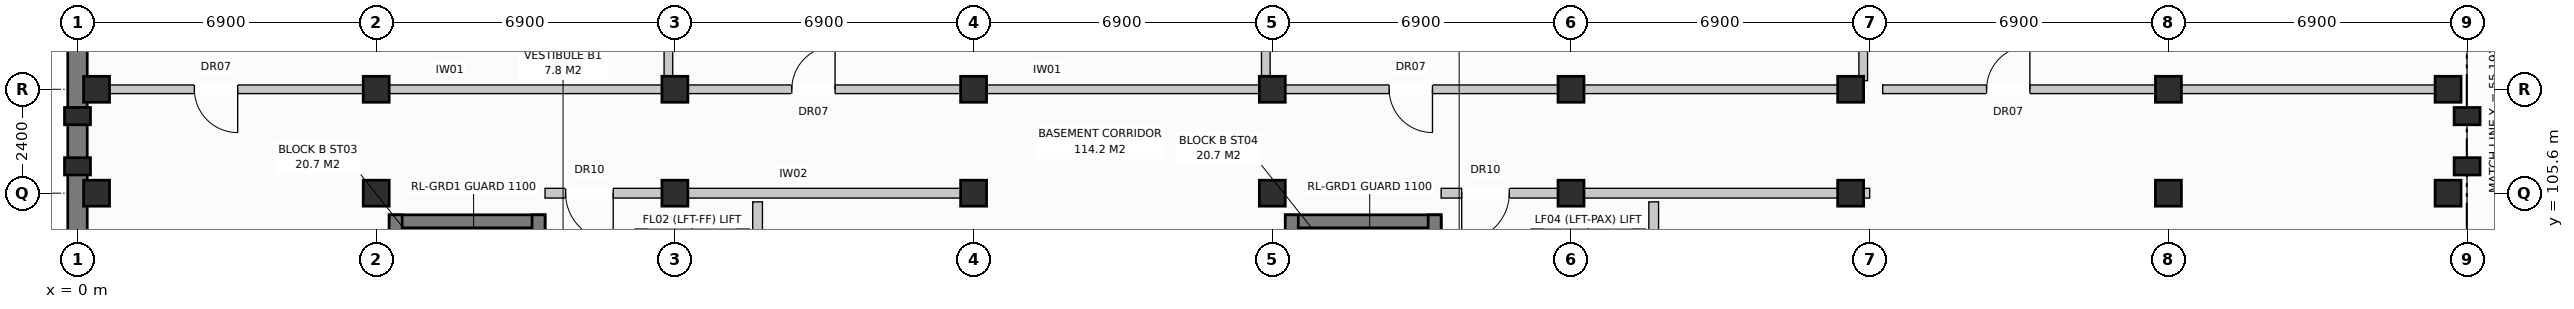
"""IFC4 building model, lengths in metres.
Left out: names, types, materials, properties, quantities, classifications, styles, units other than length and angle.
Written with IfcOpenShell. Run it as: python <this file> out.ifc"""

import sys

from ifc_helpers import new_model, si_unit, direction, frame, frame_2d, origin, origin_with_axes, origin_2d, place, context, subcontext, project, spatial, rectangle, extrude, element, fill, save


model = new_model("IFC4")
c1 = context("Model", 3, precision=1e-05, world=origin(), true_north=direction((0.0, 1.0)))
c2 = subcontext(c1, "Body", "Model", "MODEL_VIEW")
j1 = project(units=[si_unit("LENGTHUNIT", "METRE"), si_unit("PLANEANGLEUNIT", "RADIAN")], contexts=[c1])
p1 = place(None, origin())
s1 = spatial("IfcSite", under=j1, at=p1, CompositionType="ELEMENT")
p2 = place(p1, origin())
s2 = spatial("IfcBuilding", under=s1, at=p2, CompositionType="ELEMENT")
p3 = place(p2, frame((0.0, 0.0, -3.8)))
s3 = spatial("IfcBuildingStorey", under=s2, at=p3, CompositionType="ELEMENT", Elevation=-3.8)
for number, where, z_axis, x_axis in (
    (1, (0.44, 105.6, 0.0), (0.0, 0.0, 1.0), (1.0, 0.0, 0.0)),
    (2, (0.44, 108.0, 0.0), (0.0, 0.0, 1.0), (1.0, 0.0, 0.0)),
    (3, (6.9, 105.6, 0.0), (0.0, 0.0, 1.0), (1.0, 0.0, 0.0)),
    (4, (6.9, 108.0, 0.0), (0.0, 0.0, 1.0), (1.0, 0.0, 0.0)),
    (5, (13.8, 105.6, 0.0), (0.0, 0.0, 1.0), (1.0, 0.0, 0.0)),
    (6, (13.8, 108.0, 0.0), (0.0, 0.0, 1.0), (1.0, 0.0, 0.0)),
    (7, (20.7, 105.6, 0.0), (0.0, 0.0, 1.0), (1.0, 0.0, 0.0)),
    (8, (20.7, 108.0, 0.0), (0.0, 0.0, 1.0), (1.0, 0.0, 0.0)),
    (9, (27.6, 105.6, 0.0), (0.0, 0.0, 1.0), (1.0, 0.0, 0.0)),
    (10, (27.6, 108.0, 0.0), (0.0, 0.0, 1.0), (1.0, 0.0, 0.0)),
    (11, (34.5, 105.6, 0.0), (0.0, 0.0, 1.0), (1.0, 0.0, 0.0)),
    (12, (34.5, 108.0, 0.0), (0.0, 0.0, 1.0), (1.0, 0.0, 0.0)),
    (13, (40.96, 105.6, 0.0), (0.0, 0.0, 1.0), (1.0, 0.0, 0.0)),
    (14, (40.96, 108.0, 0.0), (0.0, 0.0, 1.0), (1.0, 0.0, 0.0)),
    (15, (48.3, 105.6, 0.0), (0.0, 0.0, 1.0), (1.0, 0.0, 0.0)),
    (16, (48.3, 108.0, 0.0), (0.0, 0.0, 1.0), (1.0, 0.0, 0.0)),
    (17, (54.76, 105.6, 0.0), (0.0, 0.0, 1.0), (1.0, 0.0, 0.0)),
    (18, (54.76, 108.0, 0.0), (0.0, 0.0, 1.0), (1.0, 0.0, 0.0)),
):
    element("IfcColumn", number, at=place(p3, frame(where, z_axis=z_axis, x_axis=x_axis)), inside=s3, PredefinedType="COLUMN", context=c2, shape_type="SweptSolid", body=[
        extrude(rectangle(XDim=0.6, YDim=0.6, at=origin_2d()), origin(), (0.0, 0.0, 1.0), 3.8),
    ])
for number, where, z_axis, x_axis in (
    (19, (0.0, 106.22, 0.0), (0.0, 0.0, 1.0), (0.0, 1.0, 0.0)),
    (20, (0.0, 107.38, 0.0), (0.0, 0.0, 1.0), (0.0, 1.0, 0.0)),
    (21, (55.2, 106.22, 0.0), (0.0, 0.0, 1.0), (0.0, 1.0, 0.0)),
    (22, (55.2, 107.38, 0.0), (0.0, 0.0, 1.0), (0.0, 1.0, 0.0)),
):
    element("IfcColumn", number, at=place(p3, frame(where, z_axis=z_axis, x_axis=x_axis)), inside=s3, PredefinedType="PILASTER", context=c2, shape_type="SweptSolid", body=[
        extrude(rectangle(XDim=0.4, YDim=0.6, at=origin_2d()), origin(), (0.0, 0.0, 1.0), 3.8),
    ])
p4 = place(p3, frame((0.0, 116.0, 0.0), z_axis=(0.0, 0.0, 1.0), x_axis=(0.0, -1.0, 0.0)))
e23 = element("IfcWall", 23, at=p4, inside=s3, PredefinedType="STANDARD", context=c2, shape_type="SweptSolid", body=[
    extrude(rectangle(XDim=116.0, YDim=0.45, at=frame_2d((58.0, 0.0))), origin(), (0.0, 0.0, 1.0), 3.48),
])
p5 = place(p3, frame((7.2, 104.95, 0.0), z_axis=(0.0, 0.0, 1.0), x_axis=(1.0, 0.0, 0.0)))
e24 = element("IfcWall", 24, at=p5, inside=s3, PredefinedType="SHEAR", context=c2, shape_type="SweptSolid", body=[
    extrude(rectangle(XDim=3.6, YDim=0.3, at=frame_2d((1.8, 0.0))), origin(), (0.0, 0.0, 1.0), 3.48),
])
p6 = place(p3, frame((7.35, 97.6, 0.0), z_axis=(0.0, 0.0, 1.0), x_axis=(0.0, 1.0, 0.0)))
e25 = element("IfcWall", 25, at=p6, inside=s3, PredefinedType="SHEAR", context=c2, shape_type="SweptSolid", body=[
    extrude(rectangle(XDim=7.5, YDim=0.3, at=frame_2d((3.75, 0.0))), origin(), (0.0, 0.0, 1.0), 3.48),
])
p7 = place(p3, frame((10.65, 97.6, 0.0), z_axis=(0.0, 0.0, 1.0), x_axis=(0.0, 1.0, 0.0)))
e26 = element("IfcWall", 26, at=p7, inside=s3, PredefinedType="SHEAR", context=c2, shape_type="SweptSolid", body=[
    extrude(rectangle(XDim=7.5, YDim=0.3, at=frame_2d((3.75, 0.0))), origin(), (0.0, 0.0, 1.0), 3.48),
])
p8 = place(p7, frame((0.65, 0.0, 0.0)))
e27 = element("IfcOpeningElement", 27, at=p8, cuts=e26, PredefinedType="OPENING", context=c2, shape_type="SweptSolid", body=[
    extrude(rectangle(XDim=1.15, YDim=2.15, at=frame_2d((0.575, 1.075))), frame((0.0, 0.162, 0.0), z_axis=(0.0, -1.0, 0.0), x_axis=(1.0, 0.0, 0.0)), (0.0, 0.0, 1.0), 0.324),
])
p9 = place(p3, frame((15.71, 97.8, 0.0), z_axis=(0.0, 0.0, 1.0), x_axis=(0.0, 1.0, 0.0)))
e28 = element("IfcWall", 28, at=p9, inside=s3, PredefinedType="PARTITIONING", context=c2, shape_type="SweptSolid", body=[
    extrude(rectangle(XDim=7.6, YDim=0.225, at=frame_2d((3.8, 0.0))), origin(), (0.0, 0.0, 1.0), 3.19),
])
p10 = place(p3, frame((6.9, 105.6, 0.0), z_axis=(0.0, 0.0, 1.0), x_axis=(1.0, 0.0, 0.0)))
e29 = element("IfcWall", 29, at=p10, inside=s3, PredefinedType="PARTITIONING", context=c2, shape_type="SweptSolid", body=[
    extrude(rectangle(XDim=0.3, YDim=0.225, at=frame_2d((0.15, 0.0))), origin(), (0.0, 0.0, 1.0), 3.48),
])
p11 = place(p3, frame((10.8, 105.6, 0.0), z_axis=(0.0, 0.0, 1.0), x_axis=(1.0, 0.0, 0.0)))
e30 = element("IfcWall", 30, at=p11, inside=s3, PredefinedType="PARTITIONING", context=c2, shape_type="SweptSolid", body=[
    extrude(rectangle(XDim=9.9, YDim=0.225, at=frame_2d((4.95, 0.0))), origin(), (0.0, 0.0, 1.0), 2.92),
])
p12 = place(p11, frame((0.475, 0.0, 0.0)))
e31 = element("IfcOpeningElement", 31, at=p12, cuts=e30, PredefinedType="OPENING", context=c2, shape_type="SweptSolid", body=[
    extrude(rectangle(XDim=1.1, YDim=2.15, at=frame_2d((0.55, 1.075))), frame((0.0, 0.125, 0.0), z_axis=(0.0, -1.0, 0.0), x_axis=(1.0, 0.0, 0.0)), (0.0, 0.0, 1.0), 0.249),
])
p13 = place(p3, frame((27.9, 104.95, 0.0), z_axis=(0.0, 0.0, 1.0), x_axis=(1.0, 0.0, 0.0)))
e32 = element("IfcWall", 32, at=p13, inside=s3, PredefinedType="SHEAR", context=c2, shape_type="SweptSolid", body=[
    extrude(rectangle(XDim=3.6, YDim=0.3, at=frame_2d((1.8, 0.0))), origin(), (0.0, 0.0, 1.0), 3.48),
])
p14 = place(p3, frame((28.05, 97.6, 0.0), z_axis=(0.0, 0.0, 1.0), x_axis=(0.0, 1.0, 0.0)))
e33 = element("IfcWall", 33, at=p14, inside=s3, PredefinedType="SHEAR", context=c2, shape_type="SweptSolid", body=[
    extrude(rectangle(XDim=7.5, YDim=0.3, at=frame_2d((3.75, 0.0))), origin(), (0.0, 0.0, 1.0), 3.48),
])
p15 = place(p3, frame((31.35, 97.6, 0.0), z_axis=(0.0, 0.0, 1.0), x_axis=(0.0, 1.0, 0.0)))
e34 = element("IfcWall", 34, at=p15, inside=s3, PredefinedType="SHEAR", context=c2, shape_type="SweptSolid", body=[
    extrude(rectangle(XDim=7.5, YDim=0.3, at=frame_2d((3.75, 0.0))), origin(), (0.0, 0.0, 1.0), 3.48),
])
p16 = place(p15, frame((0.65, 0.0, 0.0)))
e35 = element("IfcOpeningElement", 35, at=p16, cuts=e34, PredefinedType="OPENING", context=c2, shape_type="SweptSolid", body=[
    extrude(rectangle(XDim=1.15, YDim=2.15, at=frame_2d((0.575, 1.075))), frame((0.0, 0.162, 0.0), z_axis=(0.0, -1.0, 0.0), x_axis=(1.0, 0.0, 0.0)), (0.0, 0.0, 1.0), 0.324),
])
p17 = place(p3, frame((36.41, 97.8, 0.0), z_axis=(0.0, 0.0, 1.0), x_axis=(0.0, 1.0, 0.0)))
e36 = element("IfcWall", 36, at=p17, inside=s3, PredefinedType="PARTITIONING", context=c2, shape_type="SweptSolid", body=[
    extrude(rectangle(XDim=7.6, YDim=0.225, at=frame_2d((3.8, 0.0))), origin(), (0.0, 0.0, 1.0), 3.19),
])
p18 = place(p3, frame((27.6, 105.6, 0.0), z_axis=(0.0, 0.0, 1.0), x_axis=(1.0, 0.0, 0.0)))
e37 = element("IfcWall", 37, at=p18, inside=s3, PredefinedType="PARTITIONING", context=c2, shape_type="SweptSolid", body=[
    extrude(rectangle(XDim=0.3, YDim=0.225, at=frame_2d((0.15, 0.0))), origin(), (0.0, 0.0, 1.0), 3.48),
])
p19 = place(p3, frame((31.5, 105.6, 0.0), z_axis=(0.0, 0.0, 1.0), x_axis=(1.0, 0.0, 0.0)))
e38 = element("IfcWall", 38, at=p19, inside=s3, PredefinedType="PARTITIONING", context=c2, shape_type="SweptSolid", body=[
    extrude(rectangle(XDim=9.9, YDim=0.225, at=frame_2d((4.95, 0.0))), origin(), (0.0, 0.0, 1.0), 2.92),
])
p20 = place(p19, frame((0.475, 0.0, 0.0)))
e39 = element("IfcOpeningElement", 39, at=p20, cuts=e38, PredefinedType="OPENING", context=c2, shape_type="SweptSolid", body=[
    extrude(rectangle(XDim=1.1, YDim=2.15, at=frame_2d((0.55, 1.075))), frame((0.0, 0.125, 0.0), z_axis=(0.0, -1.0, 0.0), x_axis=(1.0, 0.0, 0.0)), (0.0, 0.0, 1.0), 0.249),
])
p21 = place(p3, frame((0.3, 108.0, 0.0), z_axis=(0.0, 0.0, 1.0), x_axis=(1.0, 0.0, 0.0)))
e40 = element("IfcWall", 40, at=p21, inside=s3, PredefinedType="PARTITIONING", context=c2, shape_type="SweptSolid", body=[
    extrude(rectangle(XDim=13.2, YDim=0.2, at=frame_2d((6.6, 0.0))), origin(), (0.0, 0.0, 1.0), 2.92),
])
p22 = place(p21, frame((2.4, 0.0, 0.0)))
e41 = element("IfcOpeningElement", 41, at=p22, cuts=e40, PredefinedType="OPENING", context=c2, shape_type="SweptSolid", body=[
    extrude(rectangle(XDim=1.0, YDim=2.15, at=frame_2d((0.5, 1.075))), frame((0.0, 0.112, 0.0), z_axis=(0.0, -1.0, 0.0), x_axis=(1.0, 0.0, 0.0)), (0.0, 0.0, 1.0), 0.224),
])
p23 = place(p3, frame((13.65, 108.2, 0.0), z_axis=(0.0, 0.0, 1.0), x_axis=(0.0, 1.0, 0.0)))
e42 = element("IfcWall", 42, at=p23, inside=s3, PredefinedType="PARTITIONING", context=c2, shape_type="SweptSolid", body=[
    extrude(rectangle(XDim=7.5, YDim=0.2, at=frame_2d((3.75, 0.0))), origin(), (0.0, 0.0, 1.0), 3.48),
])
p24 = place(p3, frame((14.1, 108.0, 0.0), z_axis=(0.0, 0.0, 1.0), x_axis=(1.0, 0.0, 0.0)))
e43 = element("IfcWall", 43, at=p24, inside=s3, PredefinedType="PARTITIONING", context=c2, shape_type="SweptSolid", body=[
    extrude(rectangle(XDim=13.2, YDim=0.2, at=frame_2d((6.6, 0.0))), origin(), (0.0, 0.0, 1.0), 2.92),
])
p25 = place(p24, frame((2.4, 0.0, 0.0)))
e44 = element("IfcOpeningElement", 44, at=p25, cuts=e43, PredefinedType="OPENING", context=c2, shape_type="SweptSolid", body=[
    extrude(rectangle(XDim=1.0, YDim=2.15, at=frame_2d((0.5, 1.075))), frame((0.0, 0.112, 0.0), z_axis=(0.0, -1.0, 0.0), x_axis=(1.0, 0.0, 0.0)), (0.0, 0.0, 1.0), 0.224),
])
p26 = place(p3, frame((27.45, 108.2, 0.0), z_axis=(0.0, 0.0, 1.0), x_axis=(0.0, 1.0, 0.0)))
e45 = element("IfcWall", 45, at=p26, inside=s3, PredefinedType="PARTITIONING", context=c2, shape_type="SweptSolid", body=[
    extrude(rectangle(XDim=7.5, YDim=0.2, at=frame_2d((3.75, 0.0))), origin(), (0.0, 0.0, 1.0), 3.48),
])
p27 = place(p3, frame((27.9, 108.0, 0.0), z_axis=(0.0, 0.0, 1.0), x_axis=(1.0, 0.0, 0.0)))
e46 = element("IfcWall", 46, at=p27, inside=s3, PredefinedType="PARTITIONING", context=c2, shape_type="SweptSolid", body=[
    extrude(rectangle(XDim=13.2, YDim=0.2, at=frame_2d((6.6, 0.0))), origin(), (0.0, 0.0, 1.0), 2.92),
])
p28 = place(p27, frame((2.4, 0.0, 0.0)))
e47 = element("IfcOpeningElement", 47, at=p28, cuts=e46, PredefinedType="OPENING", context=c2, shape_type="SweptSolid", body=[
    extrude(rectangle(XDim=1.0, YDim=2.15, at=frame_2d((0.5, 1.075))), frame((0.0, 0.112, 0.0), z_axis=(0.0, -1.0, 0.0), x_axis=(1.0, 0.0, 0.0)), (0.0, 0.0, 1.0), 0.224),
])
p29 = place(p3, frame((41.25, 108.2, 0.0), z_axis=(0.0, 0.0, 1.0), x_axis=(0.0, 1.0, 0.0)))
e48 = element("IfcWall", 48, at=p29, inside=s3, PredefinedType="PARTITIONING", context=c2, shape_type="SweptSolid", body=[
    extrude(rectangle(XDim=7.5, YDim=0.2, at=frame_2d((3.75, 0.0))), origin(), (0.0, 0.0, 1.0), 3.48),
])
p30 = place(p3, frame((41.7, 108.0, 0.0), z_axis=(0.0, 0.0, 1.0), x_axis=(1.0, 0.0, 0.0)))
e49 = element("IfcWall", 49, at=p30, inside=s3, PredefinedType="PARTITIONING", context=c2, shape_type="SweptSolid", body=[
    extrude(rectangle(XDim=13.2, YDim=0.2, at=frame_2d((6.6, 0.0))), origin(), (0.0, 0.0, 1.0), 2.92),
])
p31 = place(p30, frame((2.4, 0.0, 0.0)))
e50 = element("IfcOpeningElement", 50, at=p31, cuts=e49, PredefinedType="OPENING", context=c2, shape_type="SweptSolid", body=[
    extrude(rectangle(XDim=1.0, YDim=2.15, at=frame_2d((0.5, 1.075))), frame((0.0, 0.112, 0.0), z_axis=(0.0, -1.0, 0.0), x_axis=(1.0, 0.0, 0.0)), (0.0, 0.0, 1.0), 0.224),
])
p32 = place(p12, frame((1.1, 0.0, 0.0), z_axis=(0.0, 0.0, 1.0), x_axis=(-1.0, 0.0, 0.0)))
e51 = element("IfcDoor", 51, at=p32, inside=s3, OperationType="SINGLE_SWING_RIGHT", PredefinedType="DOOR", context=c2, shape_type="SweptSolid", body=[
    extrude(rectangle(XDim=1.1, YDim=2.15, at=frame_2d((0.55, 1.075))), frame((0.0, 0.025, 0.0), z_axis=(0.0, -1.0, 0.0), x_axis=(1.0, 0.0, 0.0)), (0.0, 0.0, 1.0), 0.05),
])
fill(e31, e51)
p33 = place(p20, frame((1.1, 0.0, 0.0), z_axis=(0.0, 0.0, 1.0), x_axis=(-1.0, 0.0, 0.0)))
e52 = element("IfcDoor", 52, at=p33, inside=s3, OperationType="SINGLE_SWING_LEFT", PredefinedType="DOOR", context=c2, shape_type="SweptSolid", body=[
    extrude(rectangle(XDim=1.1, YDim=2.15, at=frame_2d((0.55, 1.075))), frame((0.0, 0.025, 0.0), z_axis=(0.0, -1.0, 0.0), x_axis=(1.0, 0.0, 0.0)), (0.0, 0.0, 1.0), 0.05),
])
fill(e39, e52)
p34 = place(p22, frame((1.0, 0.0, 0.0), z_axis=(0.0, 0.0, 1.0), x_axis=(-1.0, 0.0, 0.0)))
e53 = element("IfcDoor", 53, at=p34, inside=s3, OperationType="SINGLE_SWING_RIGHT", PredefinedType="DOOR", context=c2, shape_type="SweptSolid", body=[
    extrude(rectangle(XDim=1.0, YDim=2.15, at=frame_2d((0.5, 1.075))), frame((0.0, 0.025, 0.0), z_axis=(0.0, -1.0, 0.0), x_axis=(1.0, 0.0, 0.0)), (0.0, 0.0, 1.0), 0.05),
])
fill(e41, e53)
p35 = place(p25, origin_with_axes())
e54 = element("IfcDoor", 54, at=p35, inside=s3, OperationType="SINGLE_SWING_RIGHT", PredefinedType="DOOR", context=c2, shape_type="SweptSolid", body=[
    extrude(rectangle(XDim=1.0, YDim=2.15, at=frame_2d((0.5, 1.075))), frame((0.0, 0.025, 0.0), z_axis=(0.0, -1.0, 0.0), x_axis=(1.0, 0.0, 0.0)), (0.0, 0.0, 1.0), 0.05),
])
fill(e44, e54)
p36 = place(p28, frame((1.0, 0.0, 0.0), z_axis=(0.0, 0.0, 1.0), x_axis=(-1.0, 0.0, 0.0)))
e55 = element("IfcDoor", 55, at=p36, inside=s3, OperationType="SINGLE_SWING_RIGHT", PredefinedType="DOOR", context=c2, shape_type="SweptSolid", body=[
    extrude(rectangle(XDim=1.0, YDim=2.15, at=frame_2d((0.5, 1.075))), frame((0.0, 0.025, 0.0), z_axis=(0.0, -1.0, 0.0), x_axis=(1.0, 0.0, 0.0)), (0.0, 0.0, 1.0), 0.05),
])
fill(e47, e55)
p37 = place(p31, origin_with_axes())
e56 = element("IfcDoor", 56, at=p37, inside=s3, OperationType="SINGLE_SWING_RIGHT", PredefinedType="DOOR", context=c2, shape_type="SweptSolid", body=[
    extrude(rectangle(XDim=1.0, YDim=2.15, at=frame_2d((0.5, 1.075))), frame((0.0, 0.025, 0.0), z_axis=(0.0, -1.0, 0.0), x_axis=(1.0, 0.0, 0.0)), (0.0, 0.0, 1.0), 0.05),
])
fill(e50, e56)
save(model, sys.argv[1])
